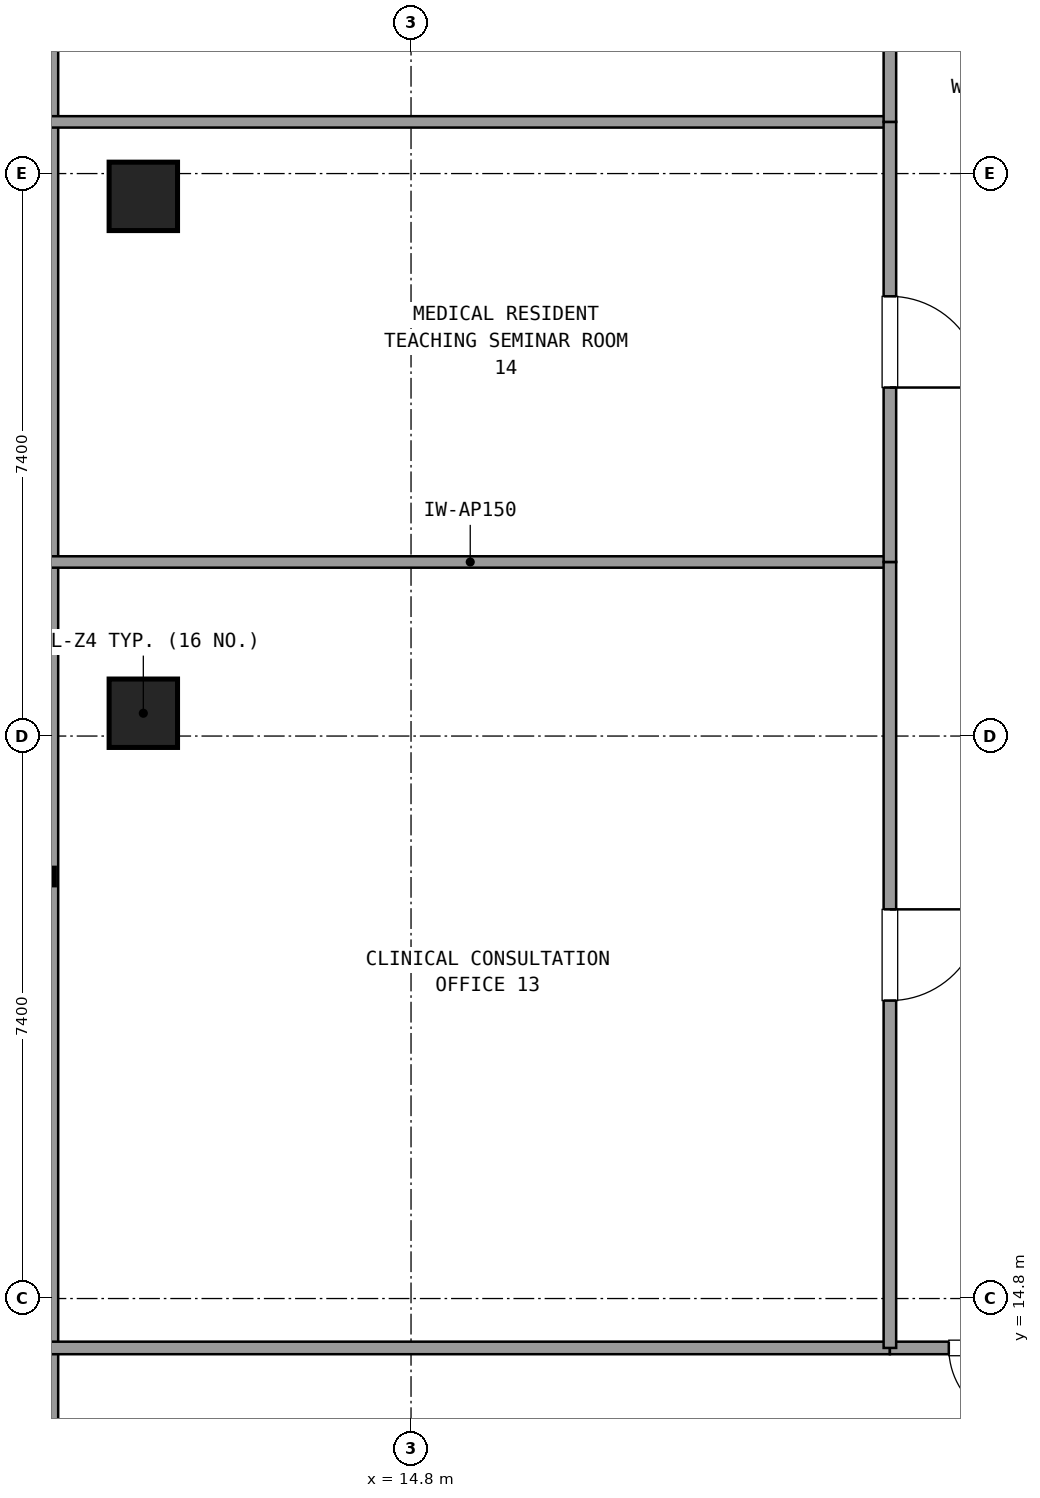
"""IFC4 building model, lengths in metres.
Left out: names, types, materials, properties, quantities, classifications, styles, units other than length and angle.
Written with IfcOpenShell. Run it as: python <this file> out.ifc"""

import sys

from ifc_helpers import new_model, si_unit, direction, frame, frame_2d, origin, origin_2d, place, context, subcontext, project, spatial, rectangle, extrude, element, fill, save


model = new_model("IFC4")
c1 = context("Model", 3, precision=1e-05, world=origin(), true_north=direction((0.0, 1.0)))
c2 = subcontext(c1, "Body", "Model", "MODEL_VIEW")
j1 = project(units=[si_unit("LENGTHUNIT", "METRE"), si_unit("PLANEANGLEUNIT", "RADIAN")], contexts=[c1])
p1 = place(None, origin())
s1 = spatial("IfcSite", under=j1, at=p1, CompositionType="ELEMENT")
p2 = place(p1, origin())
s2 = spatial("IfcBuilding", under=s1, at=p2, CompositionType="ELEMENT")
p3 = place(p2, frame((0.0, 0.0, 225.18)))
s3 = spatial("IfcBuildingStorey", under=s2, at=p3, CompositionType="ELEMENT", Elevation=225.18)
for number, where, z_axis, x_axis in (
    (1, (11.278, 22.5, 0.0), (0.0, 0.0, 1.0), (1.0, 0.0, 0.0)),
    (2, (11.278, 29.3, 0.0), (0.0, 0.0, 1.0), (1.0, 0.0, 0.0)),
):
    element("IfcColumn", number, at=place(p3, frame(where, z_axis=z_axis, x_axis=x_axis)), inside=s3, PredefinedType="COLUMN", context=c2, shape_type="SweptSolid", body=[
        extrude(rectangle(XDim=0.9, YDim=0.9, at=origin_2d()), origin(), (0.0, 0.0, 1.0), 3.6),
    ])
p4 = place(p3, frame((10.038, 42.545, 0.0), z_axis=(0.0, 0.0, 1.0), x_axis=(0.0, -1.0, 0.0)))
e3 = element("IfcWall", 3, at=p4, inside=s3, PredefinedType="SOLIDWALL", context=c2, shape_type="SweptSolid", body=[
    extrude(rectangle(XDim=33.29, YDim=0.24, at=frame_2d((16.645, 0.0))), origin(), (0.0, 0.0, 1.0), 0.85),
])
p5 = place(p3, frame((10.058, 14.15, 0.0), z_axis=(0.0, 0.0, 1.0), x_axis=(1.0, 0.0, 0.0)))
e4 = element("IfcWall", 4, at=p5, inside=s3, PredefinedType="PARTITIONING", context=c2, shape_type="SweptSolid", body=[
    extrude(rectangle(XDim=11.042, YDim=0.165, at=frame_2d((5.521, 0.0))), origin(), (0.0, 0.0, 1.0), 2.61),
])
p6 = place(p3, frame((21.1, 14.15, 0.0), z_axis=(0.0, 0.0, 1.0), x_axis=(1.0, 0.0, 0.0)))
e5 = element("IfcWall", 5, at=p6, inside=s3, PredefinedType="PARTITIONING", context=c2, shape_type="SweptSolid", body=[
    extrude(rectangle(XDim=2.55, YDim=0.165, at=frame_2d((1.275, 0.0))), origin(), (0.0, 0.0, 1.0), 2.61),
])
p7 = place(p6, frame((0.775, 0.0, 0.0)))
e6 = element("IfcOpeningElement", 6, at=p7, cuts=e5, PredefinedType="OPENING", context=c2, shape_type="SweptSolid", body=[
    extrude(rectangle(XDim=1.0, YDim=2.15, at=frame_2d((0.5, 1.075))), frame((0.0, 0.093, 0.0), z_axis=(0.0, -1.0, 0.0), x_axis=(1.0, 0.0, 0.0)), (0.0, 0.0, 1.0), 0.185),
])
p8 = place(p3, frame((21.1, 24.49, 0.0), z_axis=(0.0, 0.0, 1.0), x_axis=(-1.0, 0.0, 0.0)))
e7 = element("IfcWall", 7, at=p8, inside=s3, PredefinedType="PARTITIONING", context=c2, shape_type="SweptSolid", body=[
    extrude(rectangle(XDim=11.042, YDim=0.15, at=frame_2d((5.521, 0.0))), origin(), (0.0, 0.0, 1.0), 2.61),
])
p9 = place(p3, frame((21.1, 14.15, 0.0), z_axis=(0.0, 0.0, 1.0), x_axis=(0.0, 1.0, 0.0)))
e8 = element("IfcWall", 8, at=p9, inside=s3, PredefinedType="PARTITIONING", context=c2, shape_type="SweptSolid", body=[
    extrude(rectangle(XDim=10.34, YDim=0.165, at=frame_2d((5.17, 0.0))), origin(), (0.0, 0.0, 1.0), 2.61),
])
p10 = place(p9, frame((4.57, 0.0, 0.0)))
e9 = element("IfcOpeningElement", 9, at=p10, cuts=e8, PredefinedType="OPENING", context=c2, shape_type="SweptSolid", body=[
    extrude(rectangle(XDim=1.2, YDim=2.15, at=frame_2d((0.6, 1.075))), frame((0.0, 0.093, 0.0), z_axis=(0.0, -1.0, 0.0), x_axis=(1.0, 0.0, 0.0)), (0.0, 0.0, 1.0), 0.185),
])
p11 = place(p3, frame((21.1, 30.28, 0.0), z_axis=(0.0, 0.0, 1.0), x_axis=(-1.0, 0.0, 0.0)))
e10 = element("IfcWall", 10, at=p11, inside=s3, PredefinedType="PARTITIONING", context=c2, shape_type="SweptSolid", body=[
    extrude(rectangle(XDim=11.042, YDim=0.15, at=frame_2d((5.521, 0.0))), origin(), (0.0, 0.0, 1.0), 2.61),
])
p12 = place(p3, frame((21.1, 24.49, 0.0), z_axis=(0.0, 0.0, 1.0), x_axis=(0.0, 1.0, 0.0)))
e11 = element("IfcWall", 11, at=p12, inside=s3, PredefinedType="PARTITIONING", context=c2, shape_type="SweptSolid", body=[
    extrude(rectangle(XDim=5.79, YDim=0.165, at=frame_2d((2.895, 0.0))), origin(), (0.0, 0.0, 1.0), 2.61),
])
p13 = place(p12, frame((2.295, 0.0, 0.0)))
e12 = element("IfcOpeningElement", 12, at=p13, cuts=e11, PredefinedType="OPENING", context=c2, shape_type="SweptSolid", body=[
    extrude(rectangle(XDim=1.2, YDim=2.15, at=frame_2d((0.6, 1.075))), frame((0.0, 0.093, 0.0), z_axis=(0.0, -1.0, 0.0), x_axis=(1.0, 0.0, 0.0)), (0.0, 0.0, 1.0), 0.185),
])
p14 = place(p3, frame((21.1, 30.28, 0.0), z_axis=(0.0, 0.0, 1.0), x_axis=(0.0, 1.0, 0.0)))
e13 = element("IfcWall", 13, at=p14, inside=s3, PredefinedType="PARTITIONING", context=c2, shape_type="SweptSolid", body=[
    extrude(rectangle(XDim=7.37, YDim=0.165, at=frame_2d((3.685, 0.0))), origin(), (0.0, 0.0, 1.0), 2.61),
])
p15 = place(p14, frame((3.085, 0.0, 0.0)))
e14 = element("IfcOpeningElement", 14, at=p15, cuts=e13, PredefinedType="OPENING", context=c2, shape_type="SweptSolid", body=[
    extrude(rectangle(XDim=1.2, YDim=2.15, at=frame_2d((0.6, 1.075))), frame((0.0, 0.093, 0.0), z_axis=(0.0, -1.0, 0.0), x_axis=(1.0, 0.0, 0.0)), (0.0, 0.0, 1.0), 0.185),
])
p16 = place(p7, frame((1.0, 0.0, 0.0), z_axis=(0.0, 0.0, 1.0), x_axis=(-1.0, 0.0, 0.0)))
e15 = element("IfcDoor", 15, at=p16, inside=s3, OperationType="SINGLE_SWING_RIGHT", PredefinedType="DOOR", context=c2, shape_type="SweptSolid", body=[
    extrude(rectangle(XDim=1.0, YDim=2.15, at=frame_2d((0.5, 1.075))), frame((0.0, 0.025, 0.0), z_axis=(0.0, -1.0, 0.0), x_axis=(1.0, 0.0, 0.0)), (0.0, 0.0, 1.0), 0.05),
])
fill(e6, e15)
p17 = place(p10, frame((1.2, 0.0, 0.0), z_axis=(0.0, 0.0, 1.0), x_axis=(-1.0, 0.0, 0.0)))
e16 = element("IfcDoor", 16, at=p17, inside=s3, OperationType="SINGLE_SWING_RIGHT", PredefinedType="DOOR", context=c2, shape_type="SweptSolid", body=[
    extrude(rectangle(XDim=1.2, YDim=2.15, at=frame_2d((0.6, 1.075))), frame((0.0, 0.025, 0.0), z_axis=(0.0, -1.0, 0.0), x_axis=(1.0, 0.0, 0.0)), (0.0, 0.0, 1.0), 0.05),
])
fill(e9, e16)
p18 = place(p13, frame((1.2, 0.0, 0.0), z_axis=(0.0, 0.0, 1.0), x_axis=(-1.0, 0.0, 0.0)))
e17 = element("IfcDoor", 17, at=p18, inside=s3, OperationType="SINGLE_SWING_LEFT", PredefinedType="DOOR", context=c2, shape_type="SweptSolid", body=[
    extrude(rectangle(XDim=1.2, YDim=2.15, at=frame_2d((0.6, 1.075))), frame((0.0, 0.025, 0.0), z_axis=(0.0, -1.0, 0.0), x_axis=(1.0, 0.0, 0.0)), (0.0, 0.0, 1.0), 0.05),
])
fill(e12, e17)
save(model, sys.argv[1])
